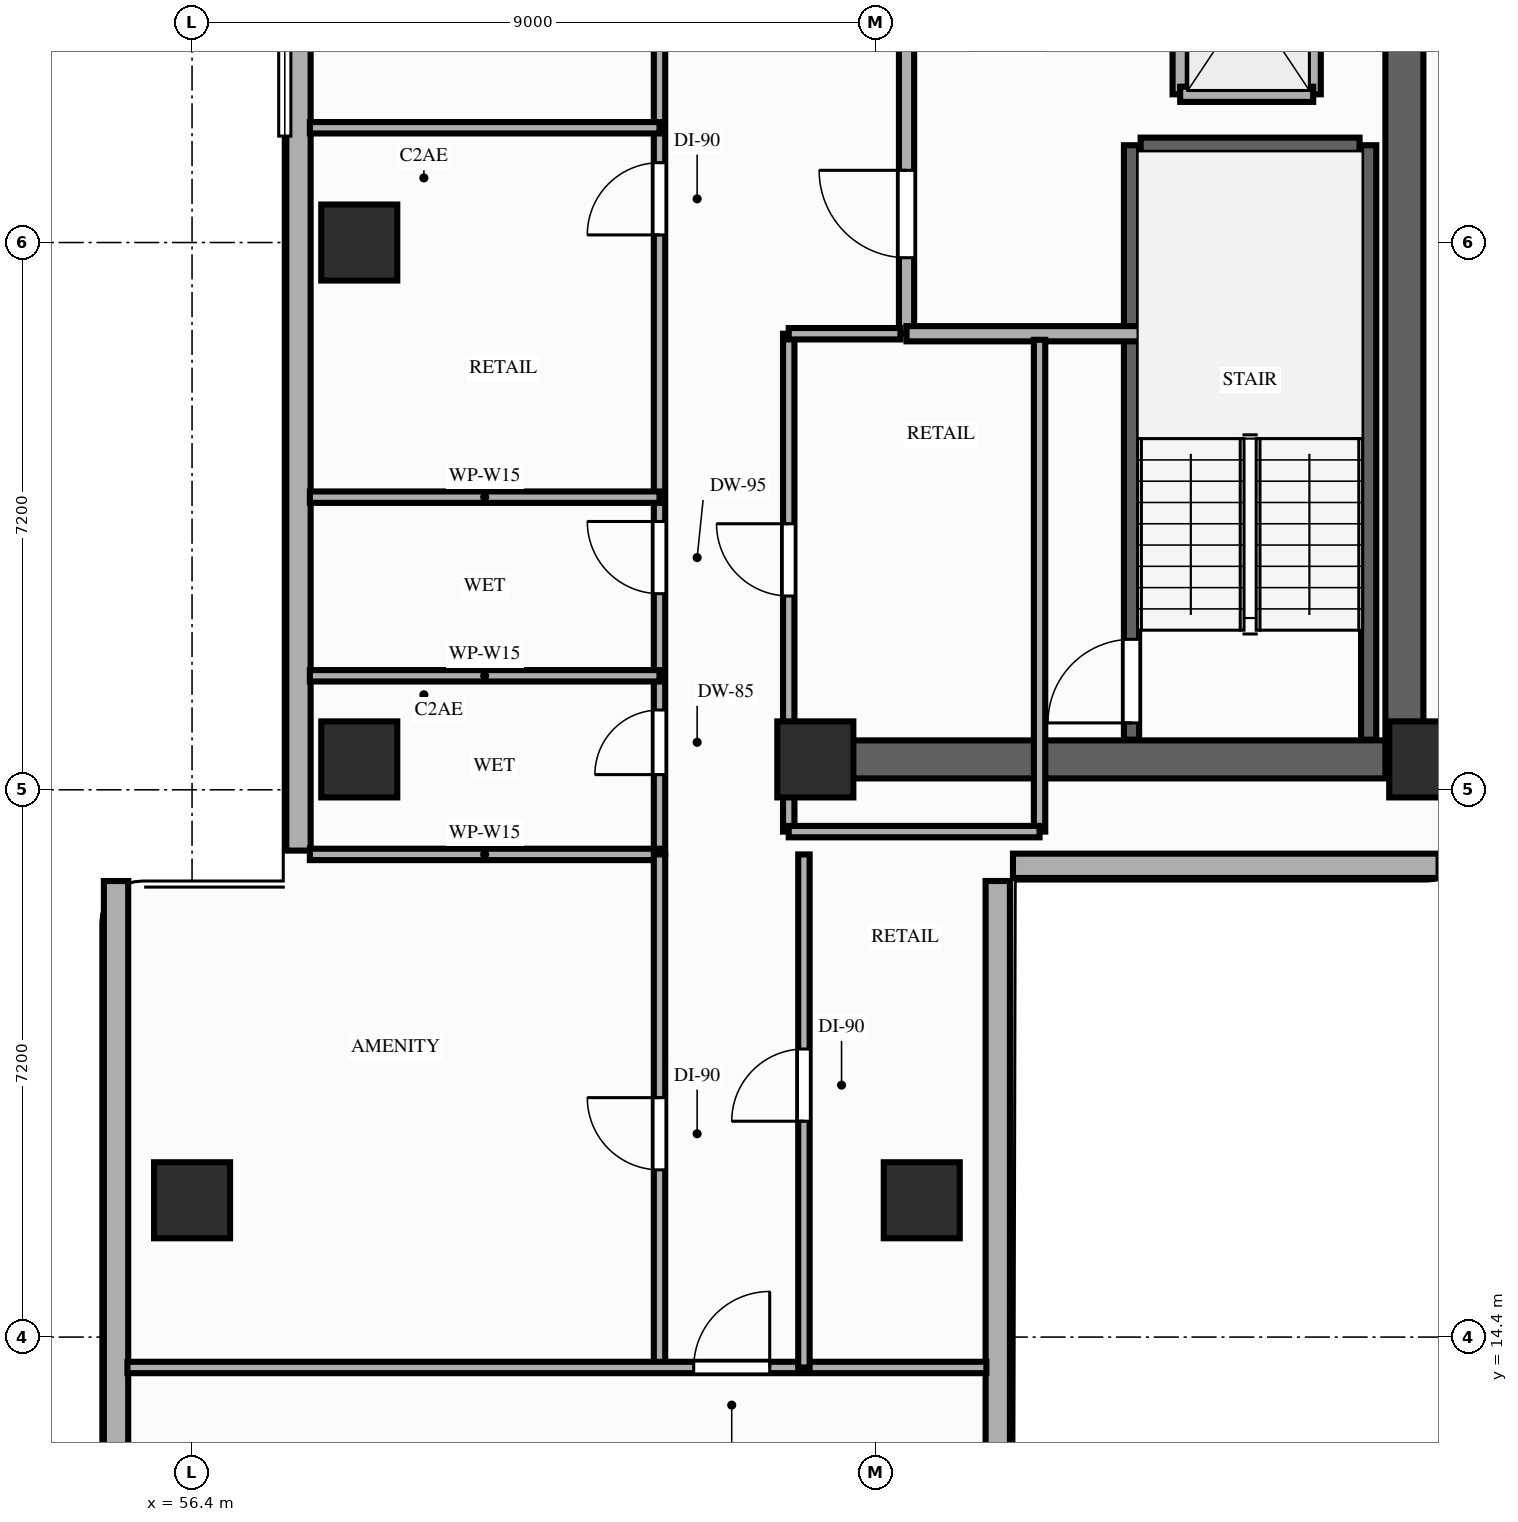
"""IFC4 building model, lengths in metres.
Left out: names, types, materials, properties, quantities, classifications, styles, units other than length and angle.
Written with IfcOpenShell. Run it as: python <this file> out.ifc"""

import sys

from ifc_helpers import new_model, si_unit, direction, frame, frame_2d, origin, origin_2d, place, context, subcontext, project, spatial, rectangle, extrude, element, fill, save


model = new_model("IFC4")
c1 = context("Model", 3, precision=1e-05, world=origin(), true_north=direction((0.0, 1.0)))
c2 = subcontext(c1, "Body", "Model", "MODEL_VIEW")
j1 = project(units=[si_unit("LENGTHUNIT", "METRE"), si_unit("PLANEANGLEUNIT", "RADIAN")], contexts=[c1])
p1 = place(None, origin())
s1 = spatial("IfcSite", under=j1, at=p1, CompositionType="ELEMENT")
p2 = place(p1, origin())
s2 = spatial("IfcBuilding", under=s1, at=p2, CompositionType="ELEMENT")
p3 = place(p2, frame((0.0, 0.0, 36.6)))
s3 = spatial("IfcBuildingStorey", under=s2, at=p3, CompositionType="ELEMENT", Elevation=36.6)
for number, where, z_axis, x_axis in (
    (1, (64.6, 22.0, 0.0), (0.0, 0.0, 1.0), (1.0, 0.0, 0.0)),
    (2, (72.65, 22.0, 0.0), (0.0, 0.0, 1.0), (1.0, 0.0, 0.0)),
    (3, (58.6, 22.0, 0.0), (0.0, 0.0, 1.0), (1.0, 0.0, 0.0)),
    (4, (58.6, 28.8, 0.0), (0.0, 0.0, 1.0), (1.0, 0.0, 0.0)),
    (5, (56.4, 16.2, 0.0), (0.0, 0.0, 1.0), (1.0, 0.0, 0.0)),
    (6, (66.0, 16.2, 0.0), (0.0, 0.0, 1.0), (1.0, 0.0, 0.0)),
):
    element("IfcColumn", number, at=place(p3, frame(where, z_axis=z_axis, x_axis=x_axis)), inside=s3, PredefinedType="COLUMN", context=c2, shape_type="SweptSolid", body=[
        extrude(rectangle(XDim=1.0, YDim=1.0, at=origin_2d()), origin(), (0.0, 0.0, 1.0), 3.2),
    ])
p4 = place(p3, frame((57.8, 43.4, 0.0), z_axis=(0.0, 0.0, 1.0), x_axis=(0.0, -1.0, 0.0)))
e7 = element("IfcWall", 7, at=p4, inside=s3, PredefinedType="STANDARD", context=c2, shape_type="SweptSolid", body=[
    extrude(rectangle(XDim=22.6, YDim=0.32, at=frame_2d((11.3, 0.0))), origin(), (0.0, 0.0, 1.0), 2.45),
])
p5 = place(p4, frame((3.7, 0.0, 0.0)))
e8 = element("IfcOpeningElement", 8, at=p5, cuts=e7, PredefinedType="OPENING", context=c2, shape_type="SweptSolid", body=[
    extrude(rectangle(XDim=1.4, YDim=2.1, at=frame_2d((0.7, 1.05))), frame((0.0, 0.17, 0.0), z_axis=(0.0, -1.0, 0.0), x_axis=(1.0, 0.0, 0.0)), (0.0, 0.0, 1.0), 0.34),
])
for number, where, z_axis, x_axis in (
    (9, (55.4, 20.4, 0.0), (0.0, 0.0, 1.0), (0.0, -1.0, 0.0)),
    (10, (67.0, 7.6, 0.0), (0.0, 0.0, 1.0), (0.0, 1.0, 0.0)),
):
    element("IfcWall", number, at=place(p3, frame(where, z_axis=z_axis, x_axis=x_axis)), inside=s3, PredefinedType="STANDARD", context=c2, shape_type="SweptSolid", body=[
        extrude(rectangle(XDim=12.8, YDim=0.32, at=frame_2d((6.4, 0.0))), origin(), (0.0, 0.0, 1.0), 2.96),
    ])
p6 = place(p3, frame((67.2, 20.6, 0.0), z_axis=(0.0, 0.0, 1.0), x_axis=(1.0, 0.0, 0.0)))
e11 = element("IfcWall", 11, at=p6, inside=s3, PredefinedType="STANDARD", context=c2, shape_type="SweptSolid", body=[
    extrude(rectangle(XDim=5.6, YDim=0.32, at=frame_2d((2.8, 0.0))), origin(), (0.0, 0.0, 1.0), 2.96),
])
p7 = place(p3, frame((72.35, 22.0, 0.0), z_axis=(0.0, 0.0, 1.0), x_axis=(0.0, 1.0, 0.0)))
e12 = element("IfcWall", 12, at=p7, inside=s3, PredefinedType="SHEAR", context=c2, shape_type="SweptSolid", body=[
    extrude(rectangle(XDim=20.25, YDim=0.5, at=frame_2d((10.125, 0.0))), origin(), (0.0, 0.0, 1.0), 2.96),
])
p8 = place(p3, frame((64.6, 22.0, 0.0), z_axis=(0.0, 0.0, 1.0), x_axis=(1.0, 0.0, 0.0)))
e13 = element("IfcWall", 13, at=p8, inside=s3, PredefinedType="SHEAR", context=c2, shape_type="SweptSolid", body=[
    extrude(rectangle(XDim=7.5, YDim=0.5, at=frame_2d((3.75, 0.0))), origin(), (0.0, 0.0, 1.0), 2.96),
])
p9 = place(p3, frame((68.76, 22.26, 0.0), z_axis=(0.0, 0.0, 1.0), x_axis=(0.0, 1.0, 0.0)))
e14 = element("IfcWall", 14, at=p9, inside=s3, PredefinedType="SHEAR", context=c2, shape_type="SweptSolid", body=[
    extrude(rectangle(XDim=7.82, YDim=0.2, at=frame_2d((3.91, 0.0))), origin(), (0.0, 0.0, 1.0), 2.96),
])
p10 = place(p9, frame((0.22, 0.0, 0.0)))
e15 = element("IfcOpeningElement", 15, at=p10, cuts=e14, PredefinedType="OPENING", context=c2, shape_type="SweptSolid", body=[
    extrude(rectangle(XDim=1.1, YDim=2.15, at=frame_2d((0.55, 1.075))), frame((0.0, 0.11, 0.0), z_axis=(0.0, -1.0, 0.0), x_axis=(1.0, 0.0, 0.0)), (0.0, 0.0, 1.0), 0.22),
])
p11 = place(p3, frame((71.88, 22.26, 0.0), z_axis=(0.0, 0.0, 1.0), x_axis=(0.0, 1.0, 0.0)))
e16 = element("IfcWall", 16, at=p11, inside=s3, PredefinedType="SHEAR", context=c2, shape_type="SweptSolid", body=[
    extrude(rectangle(XDim=7.82, YDim=0.2, at=frame_2d((3.91, 0.0))), origin(), (0.0, 0.0, 1.0), 2.96),
])
p12 = place(p3, frame((68.88, 30.08, 0.0), z_axis=(0.0, 0.0, 1.0), x_axis=(1.0, 0.0, 0.0)))
e17 = element("IfcWall", 17, at=p12, inside=s3, PredefinedType="SHEAR", context=c2, shape_type="SweptSolid", body=[
    extrude(rectangle(XDim=2.88, YDim=0.2, at=frame_2d((1.44, 0.0))), origin(), (0.0, 0.0, 1.0), 2.96),
])
p13 = place(p3, frame((69.4, 30.75, 0.0), z_axis=(0.0, 0.0, 1.0), x_axis=(0.0, 1.0, 0.0)))
e18 = element("IfcWall", 18, at=p13, inside=s3, PredefinedType="MOVABLE", context=c2, shape_type="SweptSolid", body=[
    extrude(rectangle(XDim=2.45, YDim=0.2, at=frame_2d((1.225, 0.0))), origin(), (0.0, 0.0, 1.0), 2.96),
])
p14 = place(p13, frame((0.65, 0.0, 0.0)))
e19 = element("IfcOpeningElement", 19, at=p14, cuts=e18, PredefinedType="OPENING", context=c2, shape_type="SweptSolid", body=[
    extrude(rectangle(XDim=1.05, YDim=2.15, at=frame_2d((0.525, 1.075))), frame((0.0, 0.11, 0.0), z_axis=(0.0, -1.0, 0.0), x_axis=(1.0, 0.0, 0.0)), (0.0, 0.0, 1.0), 0.22),
])
p15 = place(p3, frame((71.15, 30.75, 0.0), z_axis=(0.0, 0.0, 1.0), x_axis=(0.0, 1.0, 0.0)))
e20 = element("IfcWall", 20, at=p15, inside=s3, PredefinedType="MOVABLE", context=c2, shape_type="SweptSolid", body=[
    extrude(rectangle(XDim=2.45, YDim=0.2, at=frame_2d((1.225, 0.0))), origin(), (0.0, 0.0, 1.0), 2.96),
])
p16 = place(p3, frame((69.4, 30.75, 0.0), z_axis=(0.0, 0.0, 1.0), x_axis=(1.0, 0.0, 0.0)))
e21 = element("IfcWall", 21, at=p16, inside=s3, PredefinedType="MOVABLE", context=c2, shape_type="SweptSolid", body=[
    extrude(rectangle(XDim=1.75, YDim=0.2, at=frame_2d((0.875, 0.0))), origin(), (0.0, 0.0, 1.0), 2.96),
])
p17 = place(p3, frame((65.8, 27.6, 0.0), z_axis=(0.0, 0.0, 1.0), x_axis=(0.0, 1.0, 0.0)))
e22 = element("IfcWall", 22, at=p17, inside=s3, PredefinedType="PARTITIONING", context=c2, shape_type="SweptSolid", body=[
    extrude(rectangle(XDim=5.5, YDim=0.2, at=frame_2d((2.75, 0.0))), origin(), (0.0, 0.0, 1.0), 2.96),
])
p18 = place(p17, frame((1.0, 0.0, 0.0)))
e23 = element("IfcOpeningElement", 23, at=p18, cuts=e22, PredefinedType="OPENING", context=c2, shape_type="SweptSolid", body=[
    extrude(rectangle(XDim=1.15, YDim=2.15, at=frame_2d((0.575, 1.075))), frame((0.0, 0.11, 0.0), z_axis=(0.0, -1.0, 0.0), x_axis=(1.0, 0.0, 0.0)), (0.0, 0.0, 1.0), 0.22),
])
p19 = place(p3, frame((65.8, 27.6, 0.0), z_axis=(0.0, 0.0, 1.0), x_axis=(1.0, 0.0, 0.0)))
e24 = element("IfcWall", 24, at=p19, inside=s3, PredefinedType="PARTITIONING", context=c2, shape_type="SweptSolid", body=[
    extrude(rectangle(XDim=3.4, YDim=0.2, at=frame_2d((1.7, 0.0))), origin(), (0.0, 0.0, 1.0), 2.96),
])
p20 = place(p3, frame((64.25, 21.05, 0.0), z_axis=(0.0, 0.0, 1.0), x_axis=(0.0, 1.0, 0.0)))
e25 = element("IfcWall", 25, at=p20, inside=s3, PredefinedType="PARTITIONING", context=c2, shape_type="SweptSolid", body=[
    extrude(rectangle(XDim=6.55, YDim=0.15, at=frame_2d((3.275, 0.0))), origin(), (0.0, 0.0, 1.0), 2.45),
])
p21 = place(p20, frame((3.1, 0.0, 0.0)))
e26 = element("IfcOpeningElement", 26, at=p21, cuts=e25, PredefinedType="OPENING", context=c2, shape_type="SweptSolid", body=[
    extrude(rectangle(XDim=0.95, YDim=2.15, at=frame_2d((0.475, 1.075))), frame((0.0, 0.085, 0.0), z_axis=(0.0, -1.0, 0.0), x_axis=(1.0, 0.0, 0.0)), (0.0, 0.0, 1.0), 0.17),
])
p22 = place(p3, frame((67.55, 21.05, 0.0), z_axis=(0.0, 0.0, 1.0), x_axis=(0.0, 1.0, 0.0)))
e27 = element("IfcWall", 27, at=p22, inside=s3, PredefinedType="PARTITIONING", context=c2, shape_type="SweptSolid", body=[
    extrude(rectangle(XDim=6.47, YDim=0.15, at=frame_2d((3.235, 0.0))), origin(), (0.0, 0.0, 1.0), 2.45),
])
p23 = place(p3, frame((64.25, 21.05, 0.0), z_axis=(0.0, 0.0, 1.0), x_axis=(1.0, 0.0, 0.0)))
e28 = element("IfcWall", 28, at=p23, inside=s3, PredefinedType="PARTITIONING", context=c2, shape_type="SweptSolid", body=[
    extrude(rectangle(XDim=3.3, YDim=0.15, at=frame_2d((1.65, 0.0))), origin(), (0.0, 0.0, 1.0), 2.45),
])
p24 = place(p3, frame((64.25, 27.6, 0.0), z_axis=(0.0, 0.0, 1.0), x_axis=(1.0, 0.0, 0.0)))
e29 = element("IfcWall", 29, at=p24, inside=s3, PredefinedType="PARTITIONING", context=c2, shape_type="SweptSolid", body=[
    extrude(rectangle(XDim=1.47, YDim=0.15, at=frame_2d((0.735, 0.0))), origin(), (0.0, 0.0, 1.0), 2.45),
])
p25 = place(p3, frame((62.55, 20.75, 0.0), z_axis=(0.0, 0.0, 1.0), x_axis=(0.0, 1.0, 0.0)))
e30 = element("IfcWall", 30, at=p25, inside=s3, PredefinedType="PARTITIONING", context=c2, shape_type="SweptSolid", body=[
    extrude(rectangle(XDim=22.7, YDim=0.15, at=frame_2d((11.35, 0.0))), origin(), (0.0, 0.0, 1.0), 2.45),
])
p26 = place(p25, frame((1.05, 0.0, 0.0)))
e31 = element("IfcOpeningElement", 31, at=p26, cuts=e30, PredefinedType="OPENING", context=c2, shape_type="SweptSolid", body=[
    extrude(rectangle(XDim=0.85, YDim=2.1, at=frame_2d((0.425, 1.05))), frame((0.0, 0.085, 0.0), z_axis=(0.0, -1.0, 0.0), x_axis=(1.0, 0.0, 0.0)), (0.0, 0.0, 1.0), 0.17),
])
p27 = place(p25, frame((3.43, 0.0, 0.0)))
e32 = element("IfcOpeningElement", 32, at=p27, cuts=e30, PredefinedType="OPENING", context=c2, shape_type="SweptSolid", body=[
    extrude(rectangle(XDim=0.95, YDim=2.1, at=frame_2d((0.475, 1.05))), frame((0.0, 0.085, 0.0), z_axis=(0.0, -1.0, 0.0), x_axis=(1.0, 0.0, 0.0)), (0.0, 0.0, 1.0), 0.17),
])
p28 = place(p25, frame((8.15, 0.0, 0.0)))
e33 = element("IfcOpeningElement", 33, at=p28, cuts=e30, PredefinedType="OPENING", context=c2, shape_type="SweptSolid", body=[
    extrude(rectangle(XDim=0.95, YDim=2.15, at=frame_2d((0.475, 1.075))), frame((0.0, 0.085, 0.0), z_axis=(0.0, -1.0, 0.0), x_axis=(1.0, 0.0, 0.0)), (0.0, 0.0, 1.0), 0.17),
])
p29 = place(p25, frame((12.14, 0.0, 0.0)))
e34 = element("IfcOpeningElement", 34, at=p29, cuts=e30, PredefinedType="OPENING", context=c2, shape_type="SweptSolid", body=[
    extrude(rectangle(XDim=0.95, YDim=2.15, at=frame_2d((0.475, 1.075))), frame((0.0, 0.085, 0.0), z_axis=(0.0, -1.0, 0.0), x_axis=(1.0, 0.0, 0.0)), (0.0, 0.0, 1.0), 0.17),
])
p30 = place(p25, frame((18.71, 0.0, 0.0)))
e35 = element("IfcOpeningElement", 35, at=p30, cuts=e30, PredefinedType="OPENING", context=c2, shape_type="SweptSolid", body=[
    extrude(rectangle(XDim=0.95, YDim=2.15, at=frame_2d((0.475, 1.075))), frame((0.0, 0.085, 0.0), z_axis=(0.0, -1.0, 0.0), x_axis=(1.0, 0.0, 0.0)), (0.0, 0.0, 1.0), 0.17),
])
for number, where, z_axis, x_axis in (
    (36, (57.95, 20.75, 0.0), (0.0, 0.0, 1.0), (1.0, 0.0, 0.0)),
    (37, (57.95, 23.1, 0.0), (0.0, 0.0, 1.0), (1.0, 0.0, 0.0)),
    (38, (57.95, 25.45, 0.0), (0.0, 0.0, 1.0), (1.0, 0.0, 0.0)),
    (39, (57.95, 30.31, 0.0), (0.0, 0.0, 1.0), (1.0, 0.0, 0.0)),
):
    element("IfcWall", number, at=place(p3, frame(where, z_axis=z_axis, x_axis=x_axis)), inside=s3, PredefinedType="PARTITIONING", context=c2, shape_type="SweptSolid", body=[
        extrude(rectangle(XDim=4.6, YDim=0.15, at=frame_2d((2.3, 0.0))), origin(), (0.0, 0.0, 1.0), 2.45),
    ])
p31 = place(p3, frame((62.55, 14.0, 0.0), z_axis=(0.0, 0.0, 1.0), x_axis=(0.0, 1.0, 0.0)))
e40 = element("IfcWall", 40, at=p31, inside=s3, PredefinedType="PARTITIONING", context=c2, shape_type="SweptSolid", body=[
    extrude(rectangle(XDim=6.75, YDim=0.15, at=frame_2d((3.375, 0.0))), origin(), (0.0, 0.0, 1.0), 2.45),
])
p32 = place(p31, frame((2.6, 0.0, 0.0)))
e41 = element("IfcOpeningElement", 41, at=p32, cuts=e40, PredefinedType="OPENING", context=c2, shape_type="SweptSolid", body=[
    extrude(rectangle(XDim=0.95, YDim=2.15, at=frame_2d((0.475, 1.075))), frame((0.0, 0.085, 0.0), z_axis=(0.0, -1.0, 0.0), x_axis=(1.0, 0.0, 0.0)), (0.0, 0.0, 1.0), 0.17),
])
p33 = place(p3, frame((55.55, 14.0, 0.0), z_axis=(0.0, 0.0, 1.0), x_axis=(1.0, 0.0, 0.0)))
e42 = element("IfcWall", 42, at=p33, inside=s3, PredefinedType="PARTITIONING", context=c2, shape_type="SweptSolid", body=[
    extrude(rectangle(XDim=11.3, YDim=0.15, at=frame_2d((5.65, 0.0))), origin(), (0.0, 0.0, 1.0), 2.45),
])
p34 = place(p33, frame((7.45, 0.0, 0.0)))
e43 = element("IfcOpeningElement", 43, at=p34, cuts=e42, PredefinedType="OPENING", context=c2, shape_type="SweptSolid", body=[
    extrude(rectangle(XDim=1.0, YDim=2.15, at=frame_2d((0.5, 1.075))), frame((0.0, 0.085, 0.0), z_axis=(0.0, -1.0, 0.0), x_axis=(1.0, 0.0, 0.0)), (0.0, 0.0, 1.0), 0.17),
])
p35 = place(p3, frame((64.45, 14.0, 0.0), z_axis=(0.0, 0.0, 1.0), x_axis=(0.0, 1.0, 0.0)))
e44 = element("IfcWall", 44, at=p35, inside=s3, PredefinedType="PARTITIONING", context=c2, shape_type="SweptSolid", body=[
    extrude(rectangle(XDim=6.75, YDim=0.15, at=frame_2d((3.375, 0.0))), origin(), (0.0, 0.0, 1.0), 2.45),
])
p36 = place(p35, frame((3.24, 0.0, 0.0)))
e45 = element("IfcOpeningElement", 45, at=p36, cuts=e44, PredefinedType="OPENING", context=c2, shape_type="SweptSolid", body=[
    extrude(rectangle(XDim=0.95, YDim=2.15, at=frame_2d((0.475, 1.075))), frame((0.0, 0.085, 0.0), z_axis=(0.0, -1.0, 0.0), x_axis=(1.0, 0.0, 0.0)), (0.0, 0.0, 1.0), 0.17),
])
p37 = place(p10, origin())
e46 = element("IfcDoor", 46, at=p37, inside=s3, OperationType="SINGLE_SWING_LEFT", PredefinedType="DOOR", context=c2, shape_type="SweptSolid", body=[
    extrude(rectangle(XDim=1.1, YDim=2.15, at=frame_2d((0.55, 1.075))), frame((0.0, 0.025, 0.0), z_axis=(0.0, -1.0, 0.0), x_axis=(1.0, 0.0, 0.0)), (0.0, 0.0, 1.0), 0.05),
])
fill(e15, e46)
p38 = place(p18, origin())
e47 = element("IfcDoor", 47, at=p38, inside=s3, OperationType="SINGLE_SWING_RIGHT", PredefinedType="DOOR", context=c2, shape_type="SweptSolid", body=[
    extrude(rectangle(XDim=1.15, YDim=2.15, at=frame_2d((0.575, 1.075))), frame((0.0, 0.025, 0.0), z_axis=(0.0, -1.0, 0.0), x_axis=(1.0, 0.0, 0.0)), (0.0, 0.0, 1.0), 0.05),
])
fill(e23, e47)
p39 = place(p21, origin())
e48 = element("IfcDoor", 48, at=p39, inside=s3, OperationType="SINGLE_SWING_RIGHT", PredefinedType="DOOR", context=c2, shape_type="SweptSolid", body=[
    extrude(rectangle(XDim=0.95, YDim=2.15, at=frame_2d((0.475, 1.075))), frame((0.0, 0.025, 0.0), z_axis=(0.0, -1.0, 0.0), x_axis=(1.0, 0.0, 0.0)), (0.0, 0.0, 1.0), 0.05),
])
fill(e26, e48)
p40 = place(p26, origin())
e49 = element("IfcDoor", 49, at=p40, inside=s3, OperationType="SINGLE_SWING_LEFT", PredefinedType="DOOR", context=c2, shape_type="SweptSolid", body=[
    extrude(rectangle(XDim=0.85, YDim=2.1, at=frame_2d((0.425, 1.05))), frame((0.0, 0.025, 0.0), z_axis=(0.0, -1.0, 0.0), x_axis=(1.0, 0.0, 0.0)), (0.0, 0.0, 1.0), 0.05),
])
fill(e31, e49)
p41 = place(p27, origin())
e50 = element("IfcDoor", 50, at=p41, inside=s3, OperationType="SINGLE_SWING_RIGHT", PredefinedType="DOOR", context=c2, shape_type="SweptSolid", body=[
    extrude(rectangle(XDim=0.95, YDim=2.1, at=frame_2d((0.475, 1.05))), frame((0.0, 0.025, 0.0), z_axis=(0.0, -1.0, 0.0), x_axis=(1.0, 0.0, 0.0)), (0.0, 0.0, 1.0), 0.05),
])
fill(e32, e50)
p42 = place(p28, origin())
e51 = element("IfcDoor", 51, at=p42, inside=s3, OperationType="SINGLE_SWING_LEFT", PredefinedType="DOOR", context=c2, shape_type="SweptSolid", body=[
    extrude(rectangle(XDim=0.95, YDim=2.15, at=frame_2d((0.475, 1.075))), frame((0.0, 0.025, 0.0), z_axis=(0.0, -1.0, 0.0), x_axis=(1.0, 0.0, 0.0)), (0.0, 0.0, 1.0), 0.05),
])
fill(e33, e51)
p43 = place(p32, origin())
e52 = element("IfcDoor", 52, at=p43, inside=s3, OperationType="SINGLE_SWING_RIGHT", PredefinedType="DOOR", context=c2, shape_type="SweptSolid", body=[
    extrude(rectangle(XDim=0.95, YDim=2.15, at=frame_2d((0.475, 1.075))), frame((0.0, 0.025, 0.0), z_axis=(0.0, -1.0, 0.0), x_axis=(1.0, 0.0, 0.0)), (0.0, 0.0, 1.0), 0.05),
])
fill(e41, e52)
p44 = place(p36, origin())
e53 = element("IfcDoor", 53, at=p44, inside=s3, OperationType="SINGLE_SWING_LEFT", PredefinedType="DOOR", context=c2, shape_type="SweptSolid", body=[
    extrude(rectangle(XDim=0.95, YDim=2.15, at=frame_2d((0.475, 1.075))), frame((0.0, 0.025, 0.0), z_axis=(0.0, -1.0, 0.0), x_axis=(1.0, 0.0, 0.0)), (0.0, 0.0, 1.0), 0.05),
])
fill(e45, e53)
p45 = place(p34, origin())
e54 = element("IfcDoor", 54, at=p45, inside=s3, OperationType="SINGLE_SWING_RIGHT", PredefinedType="DOOR", context=c2, shape_type="SweptSolid", body=[
    extrude(rectangle(XDim=1.0, YDim=2.15, at=frame_2d((0.5, 1.075))), frame((0.0, 0.025, 0.0), z_axis=(0.0, -1.0, 0.0), x_axis=(1.0, 0.0, 0.0)), (0.0, 0.0, 1.0), 0.05),
])
fill(e43, e54)
save(model, sys.argv[1])
